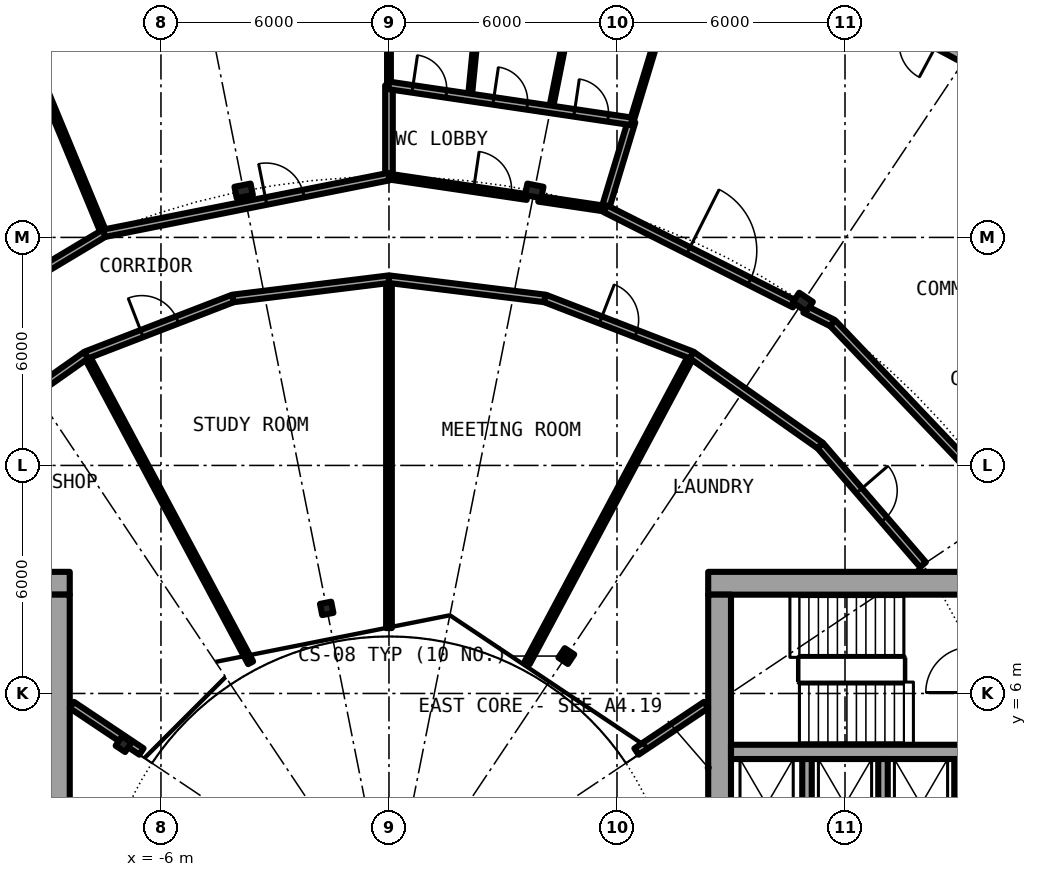
"""IFC4 building model, lengths in metres.
Left out: names, types, materials, properties, quantities, classifications, styles, units other than length and angle.
Written with IfcOpenShell. Run it as: python <this file> out.ifc"""

import sys

from ifc_helpers import new_model, si_unit, direction, frame, frame_2d, origin, origin_2d, place, context, subcontext, project, spatial, rectangle, i_section, extrude, element, fill, save


model = new_model("IFC4")
c1 = context("Model", 3, precision=1e-05, world=origin(), true_north=direction((0.0, 1.0)))
c2 = subcontext(c1, "Body", "Model", "MODEL_VIEW")
j1 = project(units=[si_unit("LENGTHUNIT", "METRE"), si_unit("PLANEANGLEUNIT", "RADIAN")], contexts=[c1])
p1 = place(None, origin())
s1 = spatial("IfcSite", under=j1, at=p1, CompositionType="ELEMENT")
p2 = place(p1, origin())
s2 = spatial("IfcBuilding", under=s1, at=p2, CompositionType="ELEMENT")
p3 = place(p2, frame((0.0, 0.0, 107.45)))
s3 = spatial("IfcBuildingStorey", under=s2, at=p3, CompositionType="ELEMENT", Elevation=107.45)
for number, where, z_axis, x_axis in (
    (1, (10.889, 16.297, 0.0), (0.0, 0.0, 1.0), (0.556, 0.831, 0.0)),
    (2, (3.824, 19.223, 0.0), (0.0, 0.0, 1.0), (0.195, 0.981, 0.0)),
    (3, (-3.824, 19.223, 0.0), (0.0, 0.0, 1.0), (-0.195, 0.981, 0.0)),
):
    element("IfcColumn", number, at=place(p3, frame(where, z_axis=z_axis, x_axis=x_axis)), inside=s3, PredefinedType="COLUMN", context=c2, shape_type="SweptSolid", body=[
        extrude(i_section(OverallWidth=0.307, OverallDepth=0.432, WebThickness=0.021, FlangeThickness=0.04, FilletRadius=0.027, at=origin_2d()), origin(), (0.0, 0.0, 1.0), 4.2),
    ])
for number, where, z_axis, x_axis in (
    (4, (4.667, 6.984, 0.0), (0.0, 0.0, 1.0), (0.556, 0.831, 0.0)),
    (5, (-1.639, 8.239, 0.0), (0.0, 0.0, 1.0), (-0.195, 0.981, 0.0)),
    (6, (-6.984, 4.667, 0.0), (0.0, 0.0, 1.0), (-0.831, 0.556, 0.0)),
):
    element("IfcColumn", number, at=place(p3, frame(where, z_axis=z_axis, x_axis=x_axis)), inside=s3, PredefinedType="COLUMN", context=c2, shape_type="SweptSolid", body=[
        extrude(i_section(OverallWidth=0.3, OverallDepth=0.3, WebThickness=0.011, FlangeThickness=0.019, FilletRadius=0.027, at=origin_2d()), origin(), (0.0, 0.0, 1.0), 4.2),
    ])
p4 = place(p3, frame((15.167, 22.699, 0.0), z_axis=(0.0, 0.0, 1.0), x_axis=(-0.881915646801, 0.471407246368, 0.0)))
e7 = element("IfcWall", 7, at=p4, inside=s3, PredefinedType="SOLIDWALL", context=c2, shape_type="SweptSolid", body=[
    extrude(rectangle(XDim=5.352, YDim=0.25, at=frame_2d((2.676, 0.0))), origin(), (0.0, 0.0, 1.0), 3.85),
])
p5 = place(p4, frame((0.841, 0.0, 0.0)))
e8 = element("IfcOpeningElement", 8, at=p5, cuts=e7, PredefinedType="OPENING", context=c2, shape_type="SweptSolid", body=[
    extrude(rectangle(XDim=1.0, YDim=2.2, at=frame_2d((0.5, 1.1))), frame((0.0, 0.135, 0.0), z_axis=(0.0, -1.0, 0.0), x_axis=(1.0, 0.0, 0.0)), (0.0, 0.0, 1.0), 0.27),
])
p6 = place(p4, frame((3.51, 0.0, 0.0)))
e9 = element("IfcOpeningElement", 9, at=p6, cuts=e7, PredefinedType="OPENING", context=c2, shape_type="SweptSolid", body=[
    extrude(rectangle(XDim=1.0, YDim=2.2, at=frame_2d((0.5, 1.1))), frame((0.0, 0.135, 0.0), z_axis=(0.0, -1.0, 0.0), x_axis=(1.0, 0.0, 0.0)), (0.0, 0.0, 1.0), 0.27),
])
p7 = place(p3, frame((22.2, 8.9, 0.0), z_axis=(0.0, 0.0, 1.0), x_axis=(-1.0, 0.0, 0.0)))
e10 = element("IfcWall", 10, at=p7, inside=s3, PredefinedType="SHEAR", context=c2, shape_type="SweptSolid", body=[
    extrude(rectangle(XDim=13.8, YDim=0.6, at=frame_2d((6.9, 0.0))), origin(), (0.0, 0.0, 1.0), 4.2),
])
p8 = place(p7, frame((1.125, 0.0, 0.0)))
e11 = element("IfcOpeningElement", 11, at=p8, cuts=e10, PredefinedType="OPENING", context=c2, shape_type="SweptSolid", body=[
    extrude(rectangle(XDim=1.2, YDim=2.3, at=frame_2d((0.6, 1.15))), frame((0.0, 0.31, 0.0), z_axis=(0.0, -1.0, 0.0), x_axis=(1.0, 0.0, 0.0)), (0.0, 0.0, 1.0), 0.62),
])
p9 = place(p3, frame((8.7, -8.6, 0.0), z_axis=(0.0, 0.0, 1.0), x_axis=(0.0, 1.0, 0.0)))
e12 = element("IfcWall", 12, at=p9, inside=s3, PredefinedType="SHEAR", context=c2, shape_type="SweptSolid", body=[
    extrude(rectangle(XDim=17.2, YDim=0.6, at=frame_2d((8.6, 0.0))), origin(), (0.0, 0.0, 1.0), 4.2),
])
p10 = place(p9, frame((7.4, 0.0, 0.1)))
e13 = element("IfcOpeningElement", 13, at=p10, cuts=e12, PredefinedType="OPENING", context=c2, shape_type="SweptSolid", body=[
    extrude(rectangle(XDim=2.4, YDim=2.2, at=frame_2d((1.2, 1.1))), frame((0.0, 0.31, 0.0), z_axis=(0.0, -1.0, 0.0), x_axis=(1.0, 0.0, 0.0)), (0.0, 0.0, 1.0), 0.62),
])
p11 = place(p3, frame((9.0, 4.462, 0.0), z_axis=(0.0, 0.0, 1.0), x_axis=(1.0, 0.0, 0.0)))
e14 = element("IfcWall", 14, at=p11, inside=s3, PredefinedType="SHEAR", context=c2, shape_type="SweptSolid", body=[
    extrude(rectangle(XDim=10.15, YDim=0.375, at=frame_2d((5.075, 0.0))), origin(), (0.0, 0.0, 1.0), 4.2),
])
p12 = place(p11, frame((6.6, 0.0, 0.0)))
e15 = element("IfcOpeningElement", 15, at=p12, cuts=e14, PredefinedType="OPENING", context=c2, shape_type="SweptSolid", body=[
    extrude(rectangle(XDim=1.1, YDim=2.3, at=frame_2d((0.55, 1.15))), frame((0.0, 0.198, 0.0), z_axis=(0.0, -1.0, 0.0), x_axis=(1.0, 0.0, 0.0)), (0.0, 0.0, 1.0), 0.395),
])
for number, where, z_axis, x_axis in (
    (16, (15.0, 1.825, 0.0), (0.0, 0.0, 1.0), (0.0, 1.0, 0.0)),
    (17, (11.0, 1.825, 0.0), (0.0, 0.0, 1.0), (0.0, 1.0, 0.0)),
    (18, (13.0, 1.825, 0.0), (0.0, 0.0, 1.0), (0.0, 1.0, 0.0)),
):
    element("IfcWall", number, at=place(p3, frame(where, z_axis=z_axis, x_axis=x_axis)), inside=s3, PredefinedType="SOLIDWALL", context=c2, shape_type="SweptSolid", body=[
        extrude(rectangle(XDim=2.45, YDim=0.25, at=frame_2d((1.225, 0.0))), origin(), (0.0, 0.0, 1.0), 3.85),
    ])
p13 = place(p3, frame((-8.4, 8.9, 0.0), z_axis=(0.0, 0.0, 1.0), x_axis=(-1.0, 0.0, 0.0)))
e19 = element("IfcWall", 19, at=p13, inside=s3, PredefinedType="SHEAR", context=c2, shape_type="SweptSolid", body=[
    extrude(rectangle(XDim=13.8, YDim=0.6, at=frame_2d((6.9, 0.0))), origin(), (0.0, 0.0, 1.0), 4.2),
])
p14 = place(p13, frame((11.475, 0.0, 0.0)))
e20 = element("IfcOpeningElement", 20, at=p14, cuts=e19, PredefinedType="OPENING", context=c2, shape_type="SweptSolid", body=[
    extrude(rectangle(XDim=1.2, YDim=2.3, at=frame_2d((0.6, 1.15))), frame((0.0, 0.31, 0.0), z_axis=(0.0, -1.0, 0.0), x_axis=(1.0, 0.0, 0.0)), (0.0, 0.0, 1.0), 0.62),
])
p15 = place(p3, frame((-8.7, 8.6, 0.0), z_axis=(0.0, 0.0, 1.0), x_axis=(0.0, -1.0, 0.0)))
e21 = element("IfcWall", 21, at=p15, inside=s3, PredefinedType="SHEAR", context=c2, shape_type="SweptSolid", body=[
    extrude(rectangle(XDim=17.2, YDim=0.6, at=frame_2d((8.6, 0.0))), origin(), (0.0, 0.0, 1.0), 4.2),
])
p16 = place(p15, frame((7.4, 0.0, 0.1)))
e22 = element("IfcOpeningElement", 22, at=p16, cuts=e21, PredefinedType="OPENING", context=c2, shape_type="SweptSolid", body=[
    extrude(rectangle(XDim=2.4, YDim=2.2, at=frame_2d((1.2, 1.1))), frame((0.0, 0.31, 0.0), z_axis=(0.0, -1.0, 0.0), x_axis=(1.0, 0.0, 0.0)), (0.0, 0.0, 1.0), 0.62),
])
p17 = place(p3, frame((-10.399, 25.106, 0.0), z_axis=(0.0, 0.0, 1.0), x_axis=(0.382600411313, -0.923913916587, 0.0)))
e23 = element("IfcWall", 23, at=p17, inside=s3, PredefinedType="PARTITIONING", context=c2, shape_type="SweptSolid", body=[
    extrude(rectangle(XDim=7.574, YDim=0.15, at=frame_2d((3.787, 0.0))), origin(), (0.0, 0.0, 1.0), 3.85),
])
p18 = place(p3, frame((-7.969, 14.903, 0.0), z_axis=(0.0, 0.0, 1.0), x_axis=(0.471428625665, -0.881904218667, 0.0)))
e24 = element("IfcWall", 24, at=p18, inside=s3, PredefinedType="PARTITIONING", context=c2, shape_type="SweptSolid", body=[
    extrude(rectangle(XDim=9.18, YDim=0.15, at=frame_2d((4.59, 0.0))), origin(), (0.0, 0.0, 1.0), 3.85),
])
p19 = place(p3, frame((0.0, 7.72, 0.0), z_axis=(0.0, 0.0, 1.0), x_axis=(0.0, 1.0, 0.0)))
e25 = element("IfcWall", 25, at=p19, inside=s3, PredefinedType="PARTITIONING", context=c2, shape_type="SweptSolid", body=[
    extrude(rectangle(XDim=9.18, YDim=0.15, at=frame_2d((4.59, 0.0))), origin(), (0.0, 0.0, 1.0), 3.85),
])
p20 = place(p3, frame((0.0, 19.6, 0.0), z_axis=(0.0, 0.0, 1.0), x_axis=(0.0, 1.0, 0.0)))
e26 = element("IfcWall", 26, at=p20, inside=s3, PredefinedType="PARTITIONING", context=c2, shape_type="SweptSolid", body=[
    extrude(rectangle(XDim=2.4, YDim=0.2, at=frame_2d((1.2, 0.0))), origin(), (0.0, 0.0, 1.0), 3.85),
])
p21 = place(p3, frame((0.0, 22.0, 0.0), z_axis=(0.0, 0.0, 1.0), x_axis=(0.0, 1.0, 0.0)))
e27 = element("IfcWall", 27, at=p21, inside=s3, PredefinedType="PARTITIONING", context=c2, shape_type="SweptSolid", body=[
    extrude(rectangle(XDim=5.175, YDim=0.1, at=frame_2d((2.587, 0.0))), origin(), (0.0, 0.0, 1.0), 3.85),
])
p22 = place(p3, frame((2.129, 21.684, 0.0), z_axis=(0.0, 0.0, 1.0), x_axis=(0.09767265114, 0.995218595696, 0.0)))
e28 = element("IfcWall", 28, at=p22, inside=s3, PredefinedType="PARTITIONING", context=c2, shape_type="SweptSolid", body=[
    extrude(rectangle(XDim=5.386, YDim=0.1, at=frame_2d((2.693, 0.0))), origin(), (0.0, 0.0, 1.0), 3.85),
])
p23 = place(p3, frame((3.639, 6.808, 0.0), z_axis=(0.0, 0.0, 1.0), x_axis=(0.471460365694, 0.881887251059, 0.0)))
e29 = element("IfcWall", 29, at=p23, inside=s3, PredefinedType="PARTITIONING", context=c2, shape_type="SweptSolid", body=[
    extrude(rectangle(XDim=9.18, YDim=0.15, at=frame_2d((4.59, 0.0))), origin(), (0.0, 0.0, 1.0), 3.85),
])
p24 = place(p3, frame((4.258, 21.368, 0.0), z_axis=(0.0, 0.0, 1.0), x_axis=(0.195296766469, 0.980744193461, 0.0)))
e30 = element("IfcWall", 30, at=p24, inside=s3, PredefinedType="PARTITIONING", context=c2, shape_type="SweptSolid", body=[
    extrude(rectangle(XDim=5.387, YDim=0.1, at=frame_2d((2.693, 0.0))), origin(), (0.0, 0.0, 1.0), 3.85),
])
p25 = place(p3, frame((5.69, 18.756, 0.0), z_axis=(0.0, 0.0, 1.0), x_axis=(0.290015865164, 0.957021837762, 0.0)))
e31 = element("IfcWall", 31, at=p25, inside=s3, PredefinedType="PARTITIONING", context=c2, shape_type="SweptSolid", body=[
    extrude(rectangle(XDim=2.4, YDim=0.2, at=frame_2d((1.2, 0.0))), origin(), (0.0, 0.0, 1.0), 3.85),
])
p26 = place(p3, frame((6.386, 21.053, 0.0), z_axis=(0.0, 0.0, 1.0), x_axis=(0.29025094386, 0.956950567996, 0.0)))
e32 = element("IfcWall", 32, at=p26, inside=s3, PredefinedType="PARTITIONING", context=c2, shape_type="SweptSolid", body=[
    extrude(rectangle(XDim=5.175, YDim=0.1, at=frame_2d((2.587, 0.0))), origin(), (0.0, 0.0, 1.0), 3.85),
])
for number, where, z_axis, x_axis in (
    (33, (-6.513, 4.472, 0.0), (0.0, 0.0, 1.0), (-0.831, 0.556, 0.0)),
    (34, (6.513, 4.472, 0.0), (0.0, 0.0, 1.0), (0.831, 0.556, 0.0)),
):
    element("IfcWall", number, at=place(p3, frame(where, z_axis=z_axis, x_axis=x_axis)), inside=s3, PredefinedType="PARTITIONING", context=c2, shape_type="SweptSolid", body=[
        extrude(rectangle(XDim=2.203, YDim=0.2, at=frame_2d((1.101, 0.0))), origin(), (0.0, 0.0, 1.0), 3.85),
    ])
p27 = place(p3, frame((-11.349, 12.522, 0.0), z_axis=(0.0, 0.0, 1.0), x_axis=(0.817567680547, 0.575832517079, 0.0)))
e35 = element("IfcWall", 35, at=p27, inside=s3, PredefinedType="PARTITIONING", context=c2, shape_type="SweptSolid", body=[
    extrude(rectangle(XDim=4.137, YDim=0.2, at=frame_2d((2.068, 0.0))), origin(), (0.0, 0.0, 1.0), 3.85),
])
p28 = place(p3, frame((-7.967, 14.904, 0.0), z_axis=(0.0, 0.0, 1.0), x_axis=(0.932943640288, 0.360022449363, 0.0)))
e36 = element("IfcWall", 36, at=p28, inside=s3, PredefinedType="PARTITIONING", context=c2, shape_type="SweptSolid", body=[
    extrude(rectangle(XDim=4.139, YDim=0.2, at=frame_2d((2.069, 0.0))), origin(), (0.0, 0.0, 1.0), 3.85),
])
p29 = place(p28, frame((1.569, 0.0, 0.0)))
e37 = element("IfcOpeningElement", 37, at=p29, cuts=e36, PredefinedType="OPENING", context=c2, shape_type="SweptSolid", body=[
    extrude(rectangle(XDim=1.0, YDim=2.3, at=frame_2d((0.5, 1.15))), frame((0.0, 0.11, 0.0), z_axis=(0.0, -1.0, 0.0), x_axis=(1.0, 0.0, 0.0)), (0.0, 0.0, 1.0), 0.22),
])
for number, where, z_axis, x_axis in (
    (38, (-4.106, 16.394, 0.0), (0.0, 0.0, 1.0), (0.992, 0.122, 0.0)),
    (39, (0.0, 16.9, 0.0), (0.0, 0.0, 1.0), (0.992, -0.122, 0.0)),
):
    element("IfcWall", number, at=place(p3, frame(where, z_axis=z_axis, x_axis=x_axis)), inside=s3, PredefinedType="PARTITIONING", context=c2, shape_type="SweptSolid", body=[
        extrude(rectangle(XDim=4.137, YDim=0.2, at=frame_2d((2.068, 0.0))), origin(), (0.0, 0.0, 1.0), 3.85),
    ])
p30 = place(p3, frame((4.106, 16.394, 0.0), z_axis=(0.0, 0.0, 1.0), x_axis=(0.932943640288, -0.360022449363, 0.0)))
e40 = element("IfcWall", 40, at=p30, inside=s3, PredefinedType="PARTITIONING", context=c2, shape_type="SweptSolid", body=[
    extrude(rectangle(XDim=4.139, YDim=0.2, at=frame_2d((2.069, 0.0))), origin(), (0.0, 0.0, 1.0), 3.85),
])
p31 = place(p30, frame((1.569, 0.0, 0.0)))
e41 = element("IfcOpeningElement", 41, at=p31, cuts=e40, PredefinedType="OPENING", context=c2, shape_type="SweptSolid", body=[
    extrude(rectangle(XDim=1.0, YDim=2.3, at=frame_2d((0.5, 1.15))), frame((0.0, 0.11, 0.0), z_axis=(0.0, -1.0, 0.0), x_axis=(1.0, 0.0, 0.0)), (0.0, 0.0, 1.0), 0.22),
])
p32 = place(p3, frame((7.967, 14.904, 0.0), z_axis=(0.0, 0.0, 1.0), x_axis=(0.817567680547, -0.575832517079, 0.0)))
e42 = element("IfcWall", 42, at=p32, inside=s3, PredefinedType="PARTITIONING", context=c2, shape_type="SweptSolid", body=[
    extrude(rectangle(XDim=4.137, YDim=0.2, at=frame_2d((2.068, 0.0))), origin(), (0.0, 0.0, 1.0), 3.85),
])
p33 = place(p3, frame((11.349, 12.522, 0.0), z_axis=(0.0, 0.0, 1.0), x_axis=(0.653212695939, -0.757174467256, 0.0)))
e43 = element("IfcWall", 43, at=p33, inside=s3, PredefinedType="PARTITIONING", context=c2, shape_type="SweptSolid", body=[
    extrude(rectangle(XDim=4.138, YDim=0.2, at=frame_2d((2.069, 0.0))), origin(), (0.0, 0.0, 1.0), 3.85),
])
p34 = place(p33, frame((1.569, 0.0, 0.0)))
e44 = element("IfcOpeningElement", 44, at=p34, cuts=e43, PredefinedType="OPENING", context=c2, shape_type="SweptSolid", body=[
    extrude(rectangle(XDim=1.0, YDim=2.3, at=frame_2d((0.5, 1.15))), frame((0.0, 0.11, 0.0), z_axis=(0.0, -1.0, 0.0), x_axis=(1.0, 0.0, 0.0)), (0.0, 0.0, 1.0), 0.22),
])
p35 = place(p3, frame((-7.501, 18.108, 0.0), z_axis=(0.0, 0.0, 1.0), x_axis=(0.980781515054, 0.195109250749, 0.0)))
e45 = element("IfcWall", 45, at=p35, inside=s3, PredefinedType="PARTITIONING", context=c2, shape_type="SweptSolid", body=[
    extrude(rectangle(XDim=7.648, YDim=0.2, at=frame_2d((3.824, 0.0))), origin(), (0.0, 0.0, 1.0), 3.54),
])
p36 = place(p35, frame((4.35, 0.0, 0.0)))
e46 = element("IfcOpeningElement", 46, at=p36, cuts=e45, PredefinedType="OPENING", context=c2, shape_type="SweptSolid", body=[
    extrude(rectangle(XDim=1.0, YDim=2.3, at=frame_2d((0.5, 1.15))), frame((0.0, 0.11, 0.0), z_axis=(0.0, -1.0, 0.0), x_axis=(1.0, 0.0, 0.0)), (0.0, 0.0, 1.0), 0.22),
])
p37 = place(p3, frame((5.69, 18.756, 0.0), z_axis=(0.0, 0.0, 1.0), x_axis=(0.893207084241, -0.449645532239, 0.0)))
e47 = element("IfcWall", 47, at=p37, inside=s3, PredefinedType="PARTITIONING", context=c2, shape_type="SweptSolid", body=[
    extrude(rectangle(XDim=5.578, YDim=0.2, at=frame_2d((2.789, 0.0))), origin(), (0.0, 0.0, 1.0), 3.54),
])
p38 = place(p37, frame((2.451, 0.0, 0.0)))
e48 = element("IfcOpeningElement", 48, at=p38, cuts=e47, PredefinedType="OPENING", context=c2, shape_type="SweptSolid", body=[
    extrude(rectangle(XDim=1.8, YDim=2.3, at=frame_2d((0.9, 1.15))), frame((0.0, 0.11, 0.0), z_axis=(0.0, -1.0, 0.0), x_axis=(1.0, 0.0, 0.0)), (0.0, 0.0, 1.0), 0.22),
])
p39 = place(p3, frame((10.948, 16.109, 0.0), z_axis=(0.0, 0.0, 1.0), x_axis=(0.893466351981, -0.449130134681, 0.0)))
e49 = element("IfcWall", 49, at=p39, inside=s3, PredefinedType="PARTITIONING", context=c2, shape_type="SweptSolid", body=[
    extrude(rectangle(XDim=0.815, YDim=0.2, at=frame_2d((0.407, 0.0))), origin(), (0.0, 0.0, 1.0), 3.85),
])
p40 = place(p3, frame((11.676, 15.743, 0.0), z_axis=(0.0, 0.0, 1.0), x_axis=(0.689473533908, -0.724310876655, 0.0)))
e50 = element("IfcWall", 50, at=p40, inside=s3, PredefinedType="PARTITIONING", context=c2, shape_type="SweptSolid", body=[
    extrude(rectangle(XDim=6.545, YDim=0.2, at=frame_2d((3.273, 0.0))), origin(), (0.0, 0.0, 1.0), 3.54),
])
p41 = place(p3, frame((-10.653, 16.219, 0.0), z_axis=(0.0, 0.0, 1.0), x_axis=(0.857774179698, 0.514026708103, 0.0)))
e51 = element("IfcWall", 51, at=p41, inside=s3, PredefinedType="PARTITIONING", context=c2, shape_type="SweptSolid", body=[
    extrude(rectangle(XDim=3.675, YDim=0.2, at=frame_2d((1.837, 0.0))), origin(), (0.0, 0.0, 1.0), 3.54),
])
p42 = place(p41, frame((0.473, 0.0, 0.0)))
e52 = element("IfcOpeningElement", 52, at=p42, cuts=e51, PredefinedType="OPENING", context=c2, shape_type="SweptSolid", body=[
    extrude(rectangle(XDim=1.0, YDim=2.3, at=frame_2d((0.5, 1.15))), frame((0.0, 0.11, 0.0), z_axis=(0.0, -1.0, 0.0), x_axis=(1.0, 0.0, 0.0)), (0.0, 0.0, 1.0), 0.22),
])
p43 = place(p3, frame((0.0, 19.6, 0.0), z_axis=(0.0, 0.0, 1.0), x_axis=(0.989182049247, -0.146693126787, 0.0)))
e53 = element("IfcWall", 53, at=p43, inside=s3, PredefinedType="PARTITIONING", context=c2, shape_type="SweptSolid", body=[
    extrude(rectangle(XDim=3.675, YDim=0.15, at=frame_2d((1.837, 0.0))), origin(), (0.0, 0.0, 1.0), 3.54),
])
p44 = place(p43, frame((2.25, 0.0, 0.0)))
e54 = element("IfcOpeningElement", 54, at=p44, cuts=e53, PredefinedType="OPENING", context=c2, shape_type="SweptSolid", body=[
    extrude(rectangle(XDim=1.0, YDim=2.3, at=frame_2d((0.5, 1.15))), frame((0.0, 0.085, 0.0), z_axis=(0.0, -1.0, 0.0), x_axis=(1.0, 0.0, 0.0)), (0.0, 0.0, 1.0), 0.17),
])
p45 = place(p3, frame((3.939, 19.016, 0.0), z_axis=(0.0, 0.0, 1.0), x_axis=(0.989153791914, -0.146883545509, 0.0)))
e55 = element("IfcWall", 55, at=p45, inside=s3, PredefinedType="PARTITIONING", context=c2, shape_type="SweptSolid", body=[
    extrude(rectangle(XDim=1.77, YDim=0.15, at=frame_2d((0.885, 0.0))), origin(), (0.0, 0.0, 1.0), 3.54),
])
p46 = place(p3, frame((-0.009, 22.0, 0.0), z_axis=(0.0, 0.0, 1.0), x_axis=(0.989212179465, -0.146489808511, 0.0)))
e56 = element("IfcWall", 56, at=p46, inside=s3, PredefinedType="PARTITIONING", context=c2, shape_type="SweptSolid", body=[
    extrude(rectangle(XDim=6.465, YDim=0.2, at=frame_2d((3.232, 0.0))), origin(), (0.0, 0.0, 1.0), 3.85),
])
p47 = place(p46, frame((4.939, 0.0, 0.0)))
e57 = element("IfcOpeningElement", 57, at=p47, cuts=e56, PredefinedType="OPENING", context=c2, shape_type="SweptSolid", body=[
    extrude(rectangle(XDim=0.9, YDim=2.3, at=frame_2d((0.45, 1.15))), frame((0.0, 0.11, 0.0), z_axis=(0.0, -1.0, 0.0), x_axis=(1.0, 0.0, 0.0)), (0.0, 0.0, 1.0), 0.22),
])
p48 = place(p46, frame((2.787, 0.0, 0.0)))
e58 = element("IfcOpeningElement", 58, at=p48, cuts=e56, PredefinedType="OPENING", context=c2, shape_type="SweptSolid", body=[
    extrude(rectangle(XDim=0.9, YDim=2.3, at=frame_2d((0.45, 1.15))), frame((0.0, 0.11, 0.0), z_axis=(0.0, -1.0, 0.0), x_axis=(1.0, 0.0, 0.0)), (0.0, 0.0, 1.0), 0.22),
])
p49 = place(p46, frame((0.635, 0.0, 0.0)))
e59 = element("IfcOpeningElement", 59, at=p49, cuts=e56, PredefinedType="OPENING", context=c2, shape_type="SweptSolid", body=[
    extrude(rectangle(XDim=0.9, YDim=2.3, at=frame_2d((0.45, 1.15))), frame((0.0, 0.11, 0.0), z_axis=(0.0, -1.0, 0.0), x_axis=(1.0, 0.0, 0.0)), (0.0, 0.0, 1.0), 0.22),
])
p50 = place(p44, origin())
e60 = element("IfcDoor", 60, at=p50, inside=s3, OperationType="SINGLE_SWING_RIGHT", PredefinedType="DOOR", context=c2, shape_type="SweptSolid", body=[
    extrude(rectangle(XDim=1.0, YDim=2.3, at=frame_2d((0.5, 1.15))), frame((0.0, 0.025, 0.0), z_axis=(0.0, -1.0, 0.0), x_axis=(1.0, 0.0, 0.0)), (0.0, 0.0, 1.0), 0.05),
])
fill(e54, e60)
p51 = place(p47, origin())
e61 = element("IfcDoor", 61, at=p51, inside=s3, OperationType="SINGLE_SWING_RIGHT", PredefinedType="DOOR", context=c2, shape_type="SweptSolid", body=[
    extrude(rectangle(XDim=0.9, YDim=2.3, at=frame_2d((0.45, 1.15))), frame((0.0, 0.025, 0.0), z_axis=(0.0, -1.0, 0.0), x_axis=(1.0, 0.0, 0.0)), (0.0, 0.0, 1.0), 0.05),
])
fill(e57, e61)
p52 = place(p48, origin())
e62 = element("IfcDoor", 62, at=p52, inside=s3, OperationType="SINGLE_SWING_RIGHT", PredefinedType="DOOR", context=c2, shape_type="SweptSolid", body=[
    extrude(rectangle(XDim=0.9, YDim=2.3, at=frame_2d((0.45, 1.15))), frame((0.0, 0.025, 0.0), z_axis=(0.0, -1.0, 0.0), x_axis=(1.0, 0.0, 0.0)), (0.0, 0.0, 1.0), 0.05),
])
fill(e58, e62)
p53 = place(p49, origin())
e63 = element("IfcDoor", 63, at=p53, inside=s3, OperationType="SINGLE_SWING_LEFT", PredefinedType="DOOR", context=c2, shape_type="SweptSolid", body=[
    extrude(rectangle(XDim=0.9, YDim=2.3, at=frame_2d((0.45, 1.15))), frame((0.0, 0.025, 0.0), z_axis=(0.0, -1.0, 0.0), x_axis=(1.0, 0.0, 0.0)), (0.0, 0.0, 1.0), 0.05),
])
fill(e59, e63)
p54 = place(p38, origin())
e64 = element("IfcDoor", 64, at=p54, inside=s3, OperationType="DOUBLE_DOOR_SINGLE_SWING", PredefinedType="DOOR", context=c2, shape_type="SweptSolid", body=[
    extrude(rectangle(XDim=1.8, YDim=2.3, at=frame_2d((0.9, 1.15))), frame((0.0, 0.025, 0.0), z_axis=(0.0, -1.0, 0.0), x_axis=(1.0, 0.0, 0.0)), (0.0, 0.0, 1.0), 0.05),
])
fill(e48, e64)
p55 = place(p36, origin())
e65 = element("IfcDoor", 65, at=p55, inside=s3, OperationType="SINGLE_SWING_RIGHT", PredefinedType="DOOR", context=c2, shape_type="SweptSolid", body=[
    extrude(rectangle(XDim=1.0, YDim=2.3, at=frame_2d((0.5, 1.15))), frame((0.0, 0.025, 0.0), z_axis=(0.0, -1.0, 0.0), x_axis=(1.0, 0.0, 0.0)), (0.0, 0.0, 1.0), 0.05),
])
fill(e46, e65)
p56 = place(p34, origin())
e66 = element("IfcDoor", 66, at=p56, inside=s3, OperationType="SINGLE_SWING_LEFT", PredefinedType="DOOR", context=c2, shape_type="SweptSolid", body=[
    extrude(rectangle(XDim=1.0, YDim=2.3, at=frame_2d((0.5, 1.15))), frame((0.0, 0.025, 0.0), z_axis=(0.0, -1.0, 0.0), x_axis=(1.0, 0.0, 0.0)), (0.0, 0.0, 1.0), 0.05),
])
fill(e44, e66)
p57 = place(p31, origin())
e67 = element("IfcDoor", 67, at=p57, inside=s3, OperationType="SINGLE_SWING_LEFT", PredefinedType="DOOR", context=c2, shape_type="SweptSolid", body=[
    extrude(rectangle(XDim=1.0, YDim=2.3, at=frame_2d((0.5, 1.15))), frame((0.0, 0.025, 0.0), z_axis=(0.0, -1.0, 0.0), x_axis=(1.0, 0.0, 0.0)), (0.0, 0.0, 1.0), 0.05),
])
fill(e41, e67)
p58 = place(p29, origin())
e68 = element("IfcDoor", 68, at=p58, inside=s3, OperationType="SINGLE_SWING_RIGHT", PredefinedType="DOOR", context=c2, shape_type="SweptSolid", body=[
    extrude(rectangle(XDim=1.0, YDim=2.3, at=frame_2d((0.5, 1.15))), frame((0.0, 0.025, 0.0), z_axis=(0.0, -1.0, 0.0), x_axis=(1.0, 0.0, 0.0)), (0.0, 0.0, 1.0), 0.05),
])
fill(e37, e68)
save(model, sys.argv[1])
